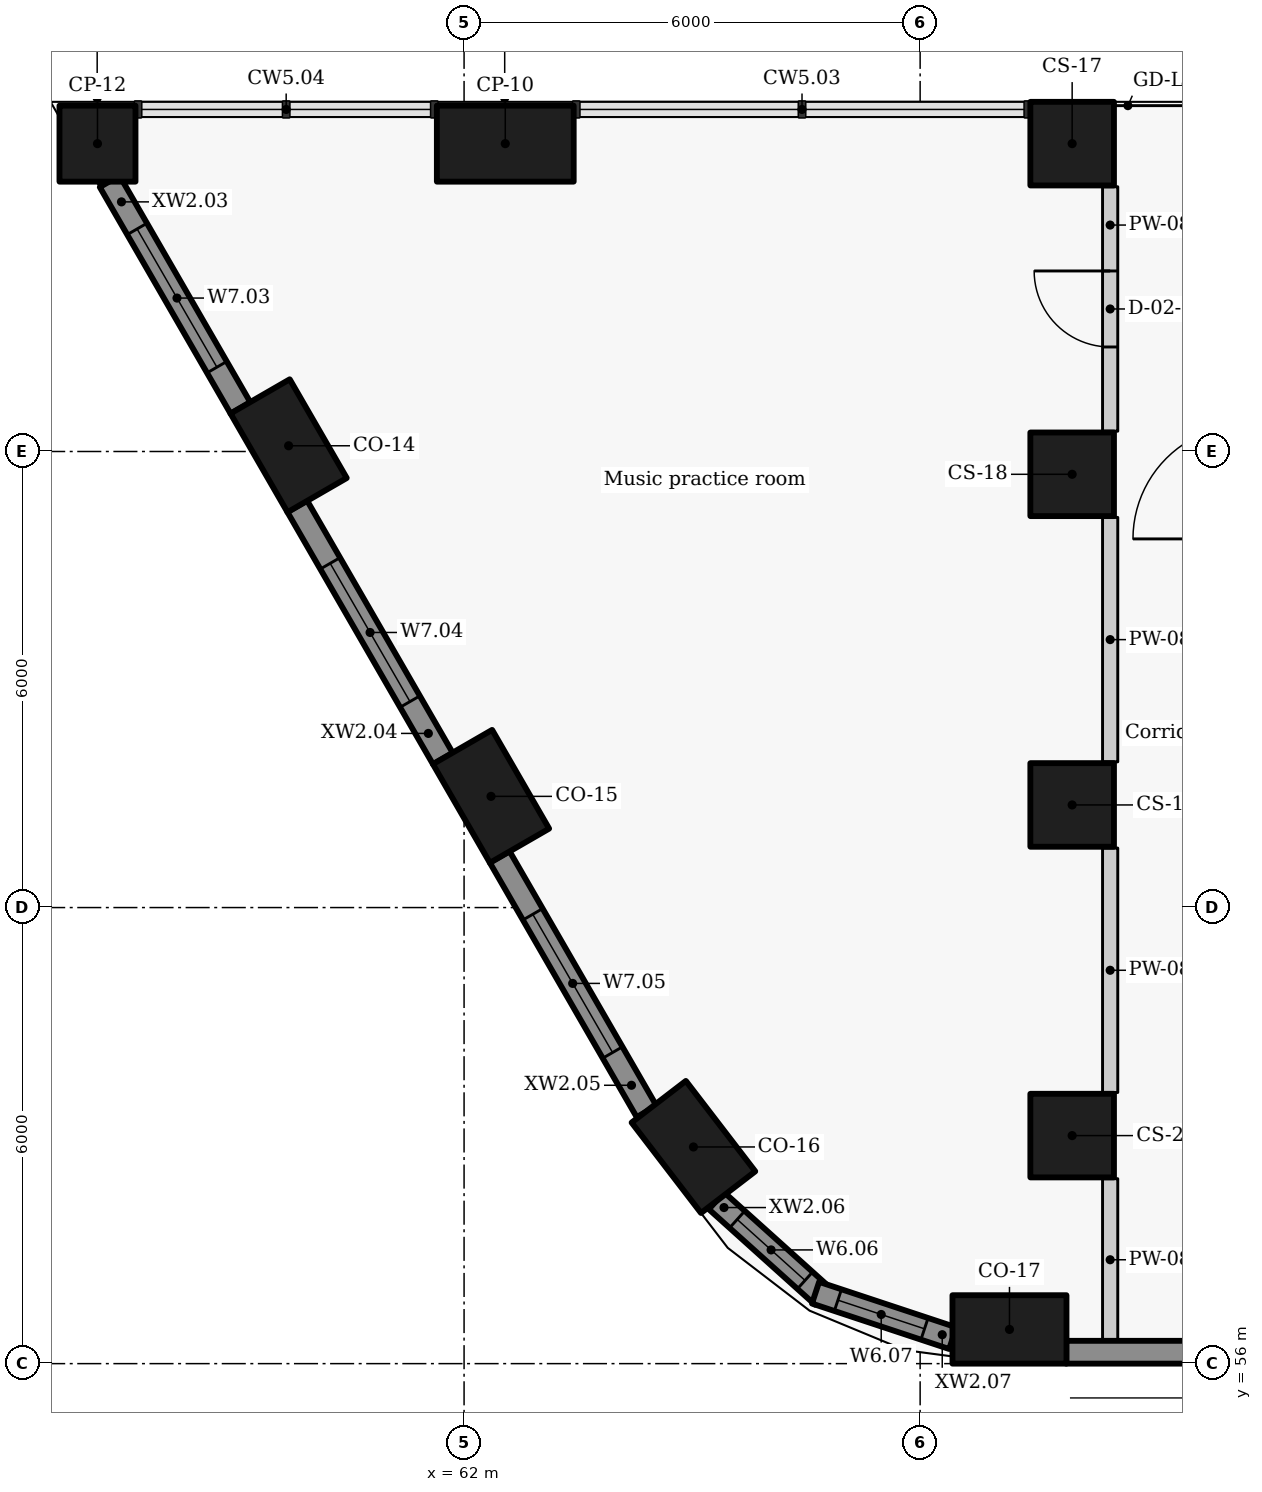
"""IFC4 building model, lengths in metres.
Left out: names, types, materials, properties, quantities, classifications, styles, units other than length and angle.
Written with IfcOpenShell. Run it as: python <this file> out.ifc"""

import sys

from ifc_helpers import new_model, si_unit, direction, frame, frame_2d, origin, origin_2d, place, context, subcontext, project, spatial, rectangle, extrude, element, fill, save


model = new_model("IFC4")
c1 = context("Model", 3, precision=1e-05, world=origin(), true_north=direction((0.0, 1.0)))
c2 = subcontext(c1, "Body", "Model", "MODEL_VIEW")
j1 = project(units=[si_unit("LENGTHUNIT", "METRE"), si_unit("PLANEANGLEUNIT", "RADIAN")], contexts=[c1])
p1 = place(None, origin())
s1 = spatial("IfcSite", under=j1, at=p1, CompositionType="ELEMENT")
p2 = place(p1, origin())
s2 = spatial("IfcBuilding", under=s1, at=p2, CompositionType="ELEMENT")
p3 = place(p2, frame((0.0, 0.0, 31.5)))
s3 = spatial("IfcBuildingStorey", under=s2, at=p3, CompositionType="ELEMENT", Elevation=31.5)
for number, where, z_axis, x_axis in (
    (1, (59.692, 68.075, 0.0), (0.0, 0.0, 1.0), (0.5, -0.866, 0.0)),
    (2, (62.354, 63.463, 0.0), (0.0, 0.0, 1.0), (0.5, -0.866, 0.0)),
    (3, (65.018, 58.851, 0.0), (0.0, 0.0, 1.0), (0.609, -0.793, 0.0)),
    (4, (69.175, 56.45, 0.0), (0.0, 0.0, 1.0), (1.0, 0.0, 0.0)),
):
    element("IfcColumn", number, at=place(p3, frame(where, z_axis=z_axis, x_axis=x_axis)), inside=s3, PredefinedType="COLUMN", context=c2, shape_type="SweptSolid", body=[
        extrude(rectangle(XDim=1.5, YDim=0.9, at=origin_2d()), origin(), (0.0, 0.0, 1.0), 3.3),
    ])
for number, where, z_axis, x_axis in (
    (5, (70.0, 72.05, 0.0), (0.0, 0.0, 1.0), (0.0, -1.0, 0.0)),
    (6, (70.0, 67.7, 0.0), (0.0, 0.0, 1.0), (0.0, -1.0, 0.0)),
    (7, (70.0, 63.35, 0.0), (0.0, 0.0, 1.0), (0.0, -1.0, 0.0)),
    (8, (70.0, 59.0, 0.0), (0.0, 0.0, 1.0), (0.0, -1.0, 0.0)),
):
    element("IfcColumn", number, at=place(p3, frame(where, z_axis=z_axis, x_axis=x_axis)), inside=s3, PredefinedType="COLUMN", context=c2, shape_type="SweptSolid", body=[
        extrude(rectangle(XDim=1.1, YDim=1.1, at=origin_2d()), origin(), (0.0, 0.0, 1.0), 3.3),
    ])
p4 = place(p3, frame((62.542, 72.05, 0.0), z_axis=(0.0, 0.0, 1.0), x_axis=(1.0, 0.0, 0.0)))
e9 = element("IfcColumn", 9, at=p4, inside=s3, PredefinedType="COLUMN", context=c2, shape_type="SweptSolid", body=[
    extrude(rectangle(XDim=1.8, YDim=1.0, at=origin_2d()), origin(), (0.0, 0.0, 1.0), 3.3),
])
p5 = place(p3, frame((57.177, 72.05, 0.0), z_axis=(0.0, 0.0, 1.0), x_axis=(1.0, 0.0, 0.0)))
e10 = element("IfcColumn", 10, at=p5, inside=s3, PredefinedType="COLUMN", context=c2, shape_type="SweptSolid", body=[
    extrude(rectangle(XDim=1.0, YDim=1.0, at=origin_2d()), origin(), (0.0, 0.0, 1.0), 3.3),
])
p6 = place(p3, frame((57.337, 71.553, 0.0), z_axis=(0.0, 0.0, 1.0), x_axis=(0.500035437112, -0.866004943191, 0.0)))
e11 = element("IfcWall", 11, at=p6, inside=s3, PredefinedType="SOLIDWALL", context=c2, shape_type="SweptSolid", body=[
    extrude(rectangle(XDim=3.444, YDim=0.3, at=frame_2d((1.722, 0.0))), origin(), (0.0, 0.0, 1.0), 2.425),
])
p7 = place(p6, frame((0.722, 0.0, 0.9)))
e12 = element("IfcOpeningElement", 12, at=p7, cuts=e11, PredefinedType="OPENING", context=c2, shape_type="SweptSolid", body=[
    extrude(rectangle(XDim=2.1, YDim=1.1, at=frame_2d((1.05, 0.55))), frame((0.0, 0.16, 0.0), z_axis=(0.0, -1.0, 0.0), x_axis=(1.0, 0.0, 0.0)), (0.0, 0.0, 1.0), 0.32),
])
p8 = place(p3, frame((59.805, 67.279, 0.0), z_axis=(0.0, 0.0, 1.0), x_axis=(0.500001735503, -0.866024401789, 0.0)))
e13 = element("IfcWall", 13, at=p8, inside=s3, PredefinedType="SOLIDWALL", context=c2, shape_type="SweptSolid", body=[
    extrude(rectangle(XDim=3.834, YDim=0.3, at=frame_2d((1.917, 0.0))), origin(), (0.0, 0.0, 1.0), 2.425),
])
p9 = place(p8, frame((0.867, 0.0, 0.9)))
e14 = element("IfcOpeningElement", 14, at=p9, cuts=e13, PredefinedType="OPENING", context=c2, shape_type="SweptSolid", body=[
    extrude(rectangle(XDim=2.1, YDim=1.1, at=frame_2d((1.05, 0.55))), frame((0.0, 0.16, 0.0), z_axis=(0.0, -1.0, 0.0), x_axis=(1.0, 0.0, 0.0)), (0.0, 0.0, 1.0), 0.32),
])
p10 = place(p3, frame((62.468, 62.667, 0.0), z_axis=(0.0, 0.0, 1.0), x_axis=(0.499948341072, -0.866055227026, 0.0)))
e15 = element("IfcWall", 15, at=p10, inside=s3, PredefinedType="SOLIDWALL", context=c2, shape_type="SweptSolid", body=[
    extrude(rectangle(XDim=3.867, YDim=0.3, at=frame_2d((1.934, 0.0))), origin(), (0.0, 0.0, 1.0), 2.425),
])
p11 = place(p10, frame((0.872, 0.0, 0.9)))
e16 = element("IfcOpeningElement", 16, at=p11, cuts=e15, PredefinedType="OPENING", context=c2, shape_type="SweptSolid", body=[
    extrude(rectangle(XDim=2.1, YDim=1.1, at=frame_2d((1.05, 0.55))), frame((0.0, 0.16, 0.0), z_axis=(0.0, -1.0, 0.0), x_axis=(1.0, 0.0, 0.0)), (0.0, 0.0, 1.0), 0.32),
])
p12 = place(p3, frame((65.32, 58.143, 0.0), z_axis=(0.0, 0.0, 1.0), x_axis=(0.7435526378, -0.668677407141, 0.0)))
e17 = element("IfcWall", 17, at=p12, inside=s3, PredefinedType="SOLIDWALL", context=c2, shape_type="SweptSolid", body=[
    extrude(rectangle(XDim=1.878, YDim=0.3, at=frame_2d((0.939, 0.0))), origin(), (0.0, 0.0, 1.0), 2.425),
])
p13 = place(p12, frame((0.367, 0.0, 0.9)))
e18 = element("IfcOpeningElement", 18, at=p13, cuts=e17, PredefinedType="OPENING", context=c2, shape_type="SweptSolid", body=[
    extrude(rectangle(XDim=1.2, YDim=1.1, at=frame_2d((0.6, 0.55))), frame((0.0, 0.16, 0.0), z_axis=(0.0, -1.0, 0.0), x_axis=(1.0, 0.0, 0.0)), (0.0, 0.0, 1.0), 0.32),
])
p14 = place(p3, frame((66.624, 56.933, 0.0), z_axis=(0.0, 0.0, 1.0), x_axis=(0.949246659442, -0.314532636683, 0.0)))
e19 = element("IfcWall", 19, at=p14, inside=s3, PredefinedType="SOLIDWALL", context=c2, shape_type="SweptSolid", body=[
    extrude(rectangle(XDim=1.902, YDim=0.3, at=frame_2d((0.951, 0.0))), origin(), (0.0, 0.0, 1.0), 2.425),
])
p15 = place(p14, frame((0.31, 0.0, 0.9)))
e20 = element("IfcOpeningElement", 20, at=p15, cuts=e19, PredefinedType="OPENING", context=c2, shape_type="SweptSolid", body=[
    extrude(rectangle(XDim=1.2, YDim=1.1, at=frame_2d((0.6, 0.55))), frame((0.0, 0.16, 0.0), z_axis=(0.0, -1.0, 0.0), x_axis=(1.0, 0.0, 0.0)), (0.0, 0.0, 1.0), 0.32),
])
p16 = place(p3, frame((69.921, 56.15, 0.0), z_axis=(0.0, 0.0, 1.0), x_axis=(1.0, 0.0, 0.0)))
e21 = element("IfcWall", 21, at=p16, inside=s3, PredefinedType="SOLIDWALL", context=c2, shape_type="SweptSolid", body=[
    extrude(rectangle(XDim=19.84, YDim=0.3, at=frame_2d((9.92, 0.0))), origin(), (0.0, 0.0, 1.0), 2.425),
])
p17 = place(p3, frame((70.5, 56.3, 0.0), z_axis=(0.0, 0.0, 1.0), x_axis=(0.0, 1.0, 0.0)))
e22 = element("IfcWall", 22, at=p17, inside=s3, PredefinedType="PARTITIONING", context=c2, shape_type="SweptSolid", body=[
    extrude(rectangle(XDim=2.133, YDim=0.2, at=frame_2d((1.066, 0.0))), origin(), (0.0, 0.0, 1.0), 3.025),
])
for number, where, z_axis, x_axis in (
    (23, (70.5, 59.567, 0.0), (0.0, 0.0, 1.0), (0.0, 1.0, 0.0)),
    (24, (70.5, 63.917, 0.0), (0.0, 0.0, 1.0), (0.0, 1.0, 0.0)),
):
    element("IfcWall", number, at=place(p3, frame(where, z_axis=z_axis, x_axis=x_axis)), inside=s3, PredefinedType="PARTITIONING", context=c2, shape_type="SweptSolid", body=[
        extrude(rectangle(XDim=3.216, YDim=0.2, at=frame_2d((1.608, 0.0))), origin(), (0.0, 0.0, 1.0), 3.025),
    ])
p18 = place(p3, frame((70.5, 68.267, 0.0), z_axis=(0.0, 0.0, 1.0), x_axis=(0.0, 1.0, 0.0)))
e25 = element("IfcWall", 25, at=p18, inside=s3, PredefinedType="PARTITIONING", context=c2, shape_type="SweptSolid", body=[
    extrude(rectangle(XDim=3.216, YDim=0.2, at=frame_2d((1.608, 0.0))), origin(), (0.0, 0.0, 1.0), 3.025),
])
p19 = place(p18, frame((1.108, 0.0, 0.0)))
e26 = element("IfcOpeningElement", 26, at=p19, cuts=e25, PredefinedType="OPENING", context=c2, shape_type="SweptSolid", body=[
    extrude(rectangle(XDim=1.0, YDim=2.1, at=frame_2d((0.5, 1.05))), frame((0.0, 0.11, 0.0), z_axis=(0.0, -1.0, 0.0), x_axis=(1.0, 0.0, 0.0)), (0.0, 0.0, 1.0), 0.22),
])
p20 = place(p7, origin())
e27 = element("IfcWindow", 27, at=p20, inside=s3, PartitioningType="SINGLE_PANEL", PredefinedType="WINDOW", context=c2, shape_type="SweptSolid", body=[
    extrude(rectangle(XDim=2.1, YDim=1.1, at=frame_2d((1.05, 0.55))), frame((0.0, 0.03, 0.0), z_axis=(0.0, -1.0, 0.0), x_axis=(1.0, 0.0, 0.0)), (0.0, 0.0, 1.0), 0.06),
])
fill(e12, e27)
p21 = place(p9, origin())
e28 = element("IfcWindow", 28, at=p21, inside=s3, PartitioningType="SINGLE_PANEL", PredefinedType="WINDOW", context=c2, shape_type="SweptSolid", body=[
    extrude(rectangle(XDim=2.1, YDim=1.1, at=frame_2d((1.05, 0.55))), frame((0.0, 0.03, 0.0), z_axis=(0.0, -1.0, 0.0), x_axis=(1.0, 0.0, 0.0)), (0.0, 0.0, 1.0), 0.06),
])
fill(e14, e28)
p22 = place(p11, origin())
e29 = element("IfcWindow", 29, at=p22, inside=s3, PartitioningType="SINGLE_PANEL", PredefinedType="WINDOW", context=c2, shape_type="SweptSolid", body=[
    extrude(rectangle(XDim=2.1, YDim=1.1, at=frame_2d((1.05, 0.55))), frame((0.0, 0.03, 0.0), z_axis=(0.0, -1.0, 0.0), x_axis=(1.0, 0.0, 0.0)), (0.0, 0.0, 1.0), 0.06),
])
fill(e16, e29)
p23 = place(p13, origin())
e30 = element("IfcWindow", 30, at=p23, inside=s3, PartitioningType="SINGLE_PANEL", PredefinedType="WINDOW", context=c2, shape_type="SweptSolid", body=[
    extrude(rectangle(XDim=1.2, YDim=1.1, at=frame_2d((0.6, 0.55))), frame((0.0, 0.03, 0.0), z_axis=(0.0, -1.0, 0.0), x_axis=(1.0, 0.0, 0.0)), (0.0, 0.0, 1.0), 0.06),
])
fill(e18, e30)
p24 = place(p15, origin())
e31 = element("IfcWindow", 31, at=p24, inside=s3, PartitioningType="SINGLE_PANEL", PredefinedType="WINDOW", context=c2, shape_type="SweptSolid", body=[
    extrude(rectangle(XDim=1.2, YDim=1.1, at=frame_2d((0.6, 0.55))), frame((0.0, 0.03, 0.0), z_axis=(0.0, -1.0, 0.0), x_axis=(1.0, 0.0, 0.0)), (0.0, 0.0, 1.0), 0.06),
])
fill(e20, e31)
p25 = place(p19, origin())
e32 = element("IfcDoor", 32, at=p25, inside=s3, OperationType="SINGLE_SWING_RIGHT", PredefinedType="DOOR", context=c2, shape_type="SweptSolid", body=[
    extrude(rectangle(XDim=1.0, YDim=2.1, at=frame_2d((0.5, 1.05))), frame((0.0, 0.025, 0.0), z_axis=(0.0, -1.0, 0.0), x_axis=(1.0, 0.0, 0.0)), (0.0, 0.0, 1.0), 0.05),
])
fill(e26, e32)
save(model, sys.argv[1])
